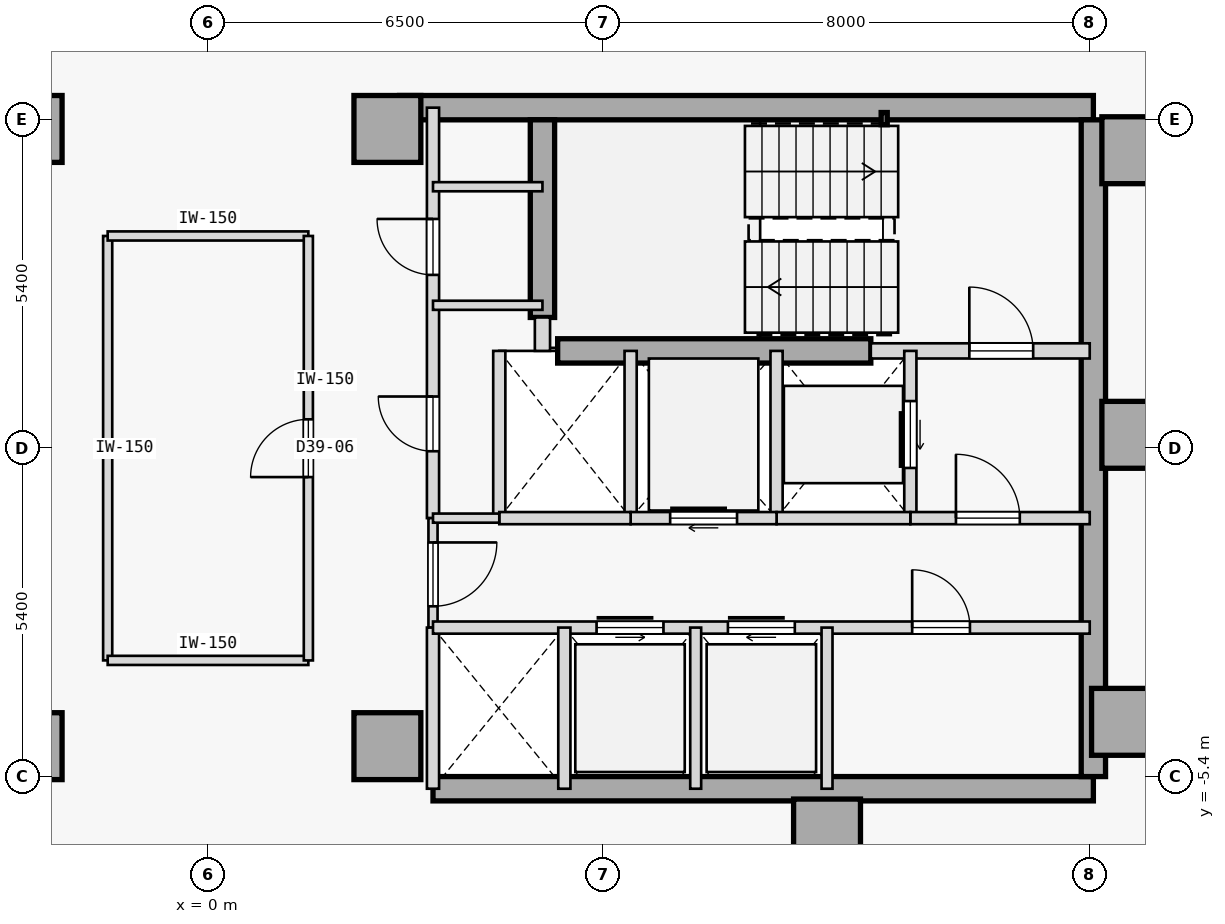
"""IFC4 building model, lengths in metres.
Left out: names, types, materials, properties, quantities, classifications, styles, units other than length and angle.
Written with IfcOpenShell. Run it as: python <this file> out.ifc"""

import sys

from ifc_helpers import new_model, si_unit, direction, frame, frame_2d, origin, origin_2d, place, context, subcontext, project, spatial, rectangle, hollow_rectangle, extrude, element, fill, save


model = new_model("IFC4")
c1 = context("Model", 3, precision=1e-05, world=origin(), true_north=direction((0.0, 1.0)))
c2 = subcontext(c1, "Body", "Model", "MODEL_VIEW")
j1 = project(units=[si_unit("LENGTHUNIT", "METRE"), si_unit("PLANEANGLEUNIT", "RADIAN")], contexts=[c1])
p1 = place(None, origin())
s1 = spatial("IfcSite", under=j1, at=p1, CompositionType="ELEMENT")
p2 = place(p1, origin())
s2 = spatial("IfcBuilding", under=s1, at=p2, CompositionType="ELEMENT")
p3 = place(p2, frame((0.0, 0.0, 154.8)))
s3 = spatial("IfcBuildingStorey", under=s2, at=p3, CompositionType="ELEMENT", Elevation=154.8)
for number, where, z_axis, x_axis in (
    (1, (-2.95, -4.9, 0.0), (0.0, 0.0, 1.0), (1.0, 0.0, 0.0)),
    (2, (-2.95, 5.25, 0.0), (0.0, 0.0, 1.0), (1.0, 0.0, 0.0)),
    (3, (15.25, 4.9, 0.0), (0.0, 0.0, 1.0), (1.0, 0.0, 0.0)),
    (4, (15.25, 0.22, 0.0), (0.0, 0.0, 1.0), (1.0, 0.0, 0.0)),
    (5, (15.08, -4.5, 0.0), (0.0, 0.0, 1.0), (1.0, 0.0, 0.0)),
    (6, (10.18, -6.32, 0.0), (0.0, 0.0, 1.0), (1.0, 0.0, 0.0)),
    (7, (2.95, -4.9, 0.0), (0.0, 0.0, 1.0), (1.0, 0.0, 0.0)),
    (8, (2.95, 5.25, 0.0), (0.0, 0.0, 1.0), (1.0, 0.0, 0.0)),
):
    element("IfcColumn", number, at=place(p3, frame(where, z_axis=z_axis, x_axis=x_axis)), inside=s3, PredefinedType="COLUMN", context=c2, shape_type="SweptSolid", body=[
        extrude(rectangle(XDim=1.1, YDim=1.1, at=origin_2d()), origin(), (0.0, 0.0, 1.0), 3.4),
    ])
p4 = place(p3, frame((3.15, 5.6, 0.0), z_axis=(0.0, 0.0, 1.0), x_axis=(1.0, 0.0, 0.0)))
e9 = element("IfcWall", 9, at=p4, inside=s3, PredefinedType="SHEAR", context=c2, shape_type="SweptSolid", body=[
    extrude(rectangle(XDim=11.41, YDim=0.4, at=frame_2d((5.705, 0.0))), origin(), (0.0, 0.0, 1.0), 3.175),
])
p5 = place(p3, frame((3.7, -5.6, 0.0), z_axis=(0.0, 0.0, 1.0), x_axis=(1.0, 0.0, 0.0)))
e10 = element("IfcWall", 10, at=p5, inside=s3, PredefinedType="SHEAR", context=c2, shape_type="SweptSolid", body=[
    extrude(rectangle(XDim=10.86, YDim=0.4, at=frame_2d((5.43, 0.0))), origin(), (0.0, 0.0, 1.0), 3.175),
])
p6 = place(p3, frame((14.56, -5.4, 0.0), z_axis=(0.0, 0.0, 1.0), x_axis=(0.0, 1.0, 0.0)))
e11 = element("IfcWall", 11, at=p6, inside=s3, PredefinedType="SHEAR", context=c2, shape_type="SweptSolid", body=[
    extrude(rectangle(XDim=10.8, YDim=0.4, at=frame_2d((5.4, 0.0))), origin(), (0.0, 0.0, 1.0), 3.175),
])
p7 = place(p3, frame((5.5, 2.15, 0.0), z_axis=(0.0, 0.0, 1.0), x_axis=(0.0, 1.0, 0.0)))
e12 = element("IfcWall", 12, at=p7, inside=s3, PredefinedType="SHEAR", context=c2, shape_type="SweptSolid", body=[
    extrude(rectangle(XDim=3.25, YDim=0.4, at=frame_2d((1.625, 0.0))), origin(), (0.0, 0.0, 1.0), 3.175),
])
p8 = place(p3, frame((5.75, 1.6, 0.0), z_axis=(0.0, 0.0, 1.0), x_axis=(1.0, 0.0, 0.0)))
e13 = element("IfcWall", 13, at=p8, inside=s3, PredefinedType="SHEAR", context=c2, shape_type="SweptSolid", body=[
    extrude(rectangle(XDim=5.15, YDim=0.4, at=frame_2d((2.575, 0.0))), origin(), (0.0, 0.0, 1.0), 3.175),
])
p9 = place(p3, frame((11.12, 5.42, 0.0), z_axis=(0.0, 0.0, 1.0), x_axis=(1.0, 0.0, 0.0)))
e14 = element("IfcColumn", 14, at=p9, inside=s3, PredefinedType="COLUMN", context=c2, shape_type="SweptSolid", body=[
    extrude(hollow_rectangle(XDim=0.1, YDim=0.2, WallThickness=0.008, at=origin_2d()), origin(), (0.0, 0.0, 1.0), 3.4),
])
p10 = place(p3, frame((10.9, 1.6, 0.0), z_axis=(0.0, 0.0, 1.0), x_axis=(1.0, 0.0, 0.0)))
e15 = element("IfcWall", 15, at=p10, inside=s3, PredefinedType="STANDARD", context=c2, shape_type="SweptSolid", body=[
    extrude(rectangle(XDim=3.6, YDim=0.25, at=frame_2d((1.8, 0.0))), origin(), (0.0, 0.0, 1.0), 3.175),
])
p11 = place(p10, frame((1.62, 0.0, 0.0)))
e16 = element("IfcOpeningElement", 16, at=p11, cuts=e15, PredefinedType="OPENING", context=c2, shape_type="SweptSolid", body=[
    extrude(rectangle(XDim=1.05, YDim=2.15, at=frame_2d((0.525, 1.075))), frame((0.0, 0.135, 0.0), z_axis=(0.0, -1.0, 0.0), x_axis=(1.0, 0.0, 0.0)), (0.0, 0.0, 1.0), 0.27),
])
p12 = place(p3, frame((5.5, 1.6, 0.0), z_axis=(0.0, 0.0, 1.0), x_axis=(0.0, 1.0, 0.0)))
e17 = element("IfcWall", 17, at=p12, inside=s3, PredefinedType="STANDARD", context=c2, shape_type="SweptSolid", body=[
    extrude(rectangle(XDim=0.55, YDim=0.25, at=frame_2d((0.275, 0.0))), origin(), (0.0, 0.0, 1.0), 3.175),
])
p13 = place(p3, frame((3.7, -1.15, 0.0), z_axis=(0.0, 0.0, 1.0), x_axis=(0.0, 1.0, 0.0)))
e18 = element("IfcWall", 18, at=p13, inside=s3, PredefinedType="STANDARD", context=c2, shape_type="SweptSolid", body=[
    extrude(rectangle(XDim=6.75, YDim=0.2, at=frame_2d((3.375, 0.0))), origin(), (0.0, 0.0, 1.0), 3.175),
])
p14 = place(p13, frame((1.1, 0.0, 0.0)))
e19 = element("IfcOpeningElement", 19, at=p14, cuts=e18, PredefinedType="OPENING", context=c2, shape_type="SweptSolid", body=[
    extrude(rectangle(XDim=0.9, YDim=2.15, at=frame_2d((0.45, 1.075))), frame((0.0, 0.11, 0.0), z_axis=(0.0, -1.0, 0.0), x_axis=(1.0, 0.0, 0.0)), (0.0, 0.0, 1.0), 0.22),
])
p15 = place(p13, frame((4.0, 0.0, 0.0)))
e20 = element("IfcOpeningElement", 20, at=p15, cuts=e18, PredefinedType="OPENING", context=c2, shape_type="SweptSolid", body=[
    extrude(rectangle(XDim=0.92, YDim=2.15, at=frame_2d((0.46, 1.075))), frame((0.0, 0.11, 0.0), z_axis=(0.0, -1.0, 0.0), x_axis=(1.0, 0.0, 0.0)), (0.0, 0.0, 1.0), 0.22),
])
p16 = place(p3, frame((3.7, -2.95, 0.0), z_axis=(0.0, 0.0, 1.0), x_axis=(0.0, 1.0, 0.0)))
e21 = element("IfcWall", 21, at=p16, inside=s3, PredefinedType="PARTITIONING", context=c2, shape_type="SweptSolid", body=[
    extrude(rectangle(XDim=1.8, YDim=0.15, at=frame_2d((0.9, 0.0))), origin(), (0.0, 0.0, 1.0), 3.175),
])
p17 = place(p16, frame((0.35, 0.0, 0.0)))
e22 = element("IfcOpeningElement", 22, at=p17, cuts=e21, PredefinedType="OPENING", context=c2, shape_type="SweptSolid", body=[
    extrude(rectangle(XDim=1.05, YDim=2.18, at=frame_2d((0.525, 1.09))), frame((0.0, 0.085, 0.0), z_axis=(0.0, -1.0, 0.0), x_axis=(1.0, 0.0, 0.0)), (0.0, 0.0, 1.0), 0.17),
])
p18 = place(p3, frame((3.7, -5.6, 0.0), z_axis=(0.0, 0.0, 1.0), x_axis=(0.0, 1.0, 0.0)))
e23 = element("IfcWall", 23, at=p18, inside=s3, PredefinedType="STANDARD", context=c2, shape_type="SweptSolid", body=[
    extrude(rectangle(XDim=2.65, YDim=0.2, at=frame_2d((1.325, 0.0))), origin(), (0.0, 0.0, 1.0), 3.175),
])
p19 = place(p3, frame((11.55, -1.15, 0.0), z_axis=(0.0, 0.0, 1.0), x_axis=(0.0, 1.0, 0.0)))
e24 = element("IfcWall", 24, at=p19, inside=s3, PredefinedType="STANDARD", context=c2, shape_type="SweptSolid", body=[
    extrude(rectangle(XDim=2.75, YDim=0.2, at=frame_2d((1.375, 0.0))), origin(), (0.0, 0.0, 1.0), 3.175),
])
p20 = place(p19, frame((0.825, 0.0, 0.0)))
e25 = element("IfcOpeningElement", 25, at=p20, cuts=e24, PredefinedType="OPENING", context=c2, shape_type="SweptSolid", body=[
    extrude(rectangle(XDim=1.1, YDim=2.15, at=frame_2d((0.55, 1.075))), frame((0.0, 0.11, 0.0), z_axis=(0.0, -1.0, 0.0), x_axis=(1.0, 0.0, 0.0)), (0.0, 0.0, 1.0), 0.22),
])
p21 = place(p3, frame((9.35, -1.15, 0.0), z_axis=(0.0, 0.0, 1.0), x_axis=(0.0, 1.0, 0.0)))
e26 = element("IfcWall", 26, at=p21, inside=s3, PredefinedType="STANDARD", context=c2, shape_type="SweptSolid", body=[
    extrude(rectangle(XDim=2.75, YDim=0.2, at=frame_2d((1.375, 0.0))), origin(), (0.0, 0.0, 1.0), 3.175),
])
p22 = place(p3, frame((11.55, -1.15, 0.0), z_axis=(0.0, 0.0, 1.0), x_axis=(1.0, 0.0, 0.0)))
e27 = element("IfcWall", 27, at=p22, inside=s3, PredefinedType="STANDARD", context=c2, shape_type="SweptSolid", body=[
    extrude(rectangle(XDim=2.95, YDim=0.2, at=frame_2d((1.475, 0.0))), origin(), (0.0, 0.0, 1.0), 3.175),
])
p23 = place(p22, frame((0.75, 0.0, 0.0)))
e28 = element("IfcOpeningElement", 28, at=p23, cuts=e27, PredefinedType="OPENING", context=c2, shape_type="SweptSolid", body=[
    extrude(rectangle(XDim=1.05, YDim=2.18, at=frame_2d((0.525, 1.09))), frame((0.0, 0.11, 0.0), z_axis=(0.0, -1.0, 0.0), x_axis=(1.0, 0.0, 0.0)), (0.0, 0.0, 1.0), 0.22),
])
p24 = place(p3, frame((9.35, -1.15, 0.0), z_axis=(0.0, 0.0, 1.0), x_axis=(1.0, 0.0, 0.0)))
e29 = element("IfcWall", 29, at=p24, inside=s3, PredefinedType="STANDARD", context=c2, shape_type="SweptSolid", body=[
    extrude(rectangle(XDim=2.2, YDim=0.2, at=frame_2d((1.1, 0.0))), origin(), (0.0, 0.0, 1.0), 3.175),
])
p25 = place(p3, frame((6.95, -1.15, 0.0), z_axis=(0.0, 0.0, 1.0), x_axis=(0.0, 1.0, 0.0)))
e30 = element("IfcWall", 30, at=p25, inside=s3, PredefinedType="STANDARD", context=c2, shape_type="SweptSolid", body=[
    extrude(rectangle(XDim=2.75, YDim=0.2, at=frame_2d((1.375, 0.0))), origin(), (0.0, 0.0, 1.0), 3.175),
])
p26 = place(p3, frame((6.95, -1.15, 0.0), z_axis=(0.0, 0.0, 1.0), x_axis=(1.0, 0.0, 0.0)))
e31 = element("IfcWall", 31, at=p26, inside=s3, PredefinedType="STANDARD", context=c2, shape_type="SweptSolid", body=[
    extrude(rectangle(XDim=2.4, YDim=0.2, at=frame_2d((1.2, 0.0))), origin(), (0.0, 0.0, 1.0), 3.175),
])
p27 = place(p26, frame((0.65, 0.0, 0.0)))
e32 = element("IfcOpeningElement", 32, at=p27, cuts=e31, PredefinedType="OPENING", context=c2, shape_type="SweptSolid", body=[
    extrude(rectangle(XDim=1.1, YDim=2.15, at=frame_2d((0.55, 1.075))), frame((0.0, 0.11, 0.0), z_axis=(0.0, -1.0, 0.0), x_axis=(1.0, 0.0, 0.0)), (0.0, 0.0, 1.0), 0.22),
])
p28 = place(p3, frame((4.79, -1.15, 0.0), z_axis=(0.0, 0.0, 1.0), x_axis=(0.0, 1.0, 0.0)))
e33 = element("IfcWall", 33, at=p28, inside=s3, PredefinedType="STANDARD", context=c2, shape_type="SweptSolid", body=[
    extrude(rectangle(XDim=2.75, YDim=0.2, at=frame_2d((1.375, 0.0))), origin(), (0.0, 0.0, 1.0), 3.175),
])
p29 = place(p3, frame((4.79, -1.15, 0.0), z_axis=(0.0, 0.0, 1.0), x_axis=(1.0, 0.0, 0.0)))
e34 = element("IfcWall", 34, at=p29, inside=s3, PredefinedType="STANDARD", context=c2, shape_type="SweptSolid", body=[
    extrude(rectangle(XDim=2.16, YDim=0.2, at=frame_2d((1.08, 0.0))), origin(), (0.0, 0.0, 1.0), 3.175),
])
p30 = place(p3, frame((3.7, -1.15, 0.0), z_axis=(0.0, 0.0, 1.0), x_axis=(1.0, 0.0, 0.0)))
e35 = element("IfcWall", 35, at=p30, inside=s3, PredefinedType="PARTITIONING", context=c2, shape_type="SweptSolid", body=[
    extrude(rectangle(XDim=1.09, YDim=0.15, at=frame_2d((0.545, 0.0))), origin(), (0.0, 0.0, 1.0), 3.175),
])
p31 = place(p3, frame((3.7, -2.95, 0.0), z_axis=(0.0, 0.0, 1.0), x_axis=(1.0, 0.0, 0.0)))
e36 = element("IfcWall", 36, at=p31, inside=s3, PredefinedType="STANDARD", context=c2, shape_type="SweptSolid", body=[
    extrude(rectangle(XDim=10.8, YDim=0.2, at=frame_2d((5.4, 0.0))), origin(), (0.0, 0.0, 1.0), 3.175),
])
p32 = place(p31, frame((2.69, 0.0, 0.0)))
e37 = element("IfcOpeningElement", 37, at=p32, cuts=e36, PredefinedType="OPENING", context=c2, shape_type="SweptSolid", body=[
    extrude(rectangle(XDim=1.1, YDim=2.15, at=frame_2d((0.55, 1.075))), frame((0.0, 0.11, 0.0), z_axis=(0.0, -1.0, 0.0), x_axis=(1.0, 0.0, 0.0)), (0.0, 0.0, 1.0), 0.22),
])
p33 = place(p31, frame((4.85, 0.0, 0.0)))
e38 = element("IfcOpeningElement", 38, at=p33, cuts=e36, PredefinedType="OPENING", context=c2, shape_type="SweptSolid", body=[
    extrude(rectangle(XDim=1.1, YDim=2.15, at=frame_2d((0.55, 1.075))), frame((0.0, 0.11, 0.0), z_axis=(0.0, -1.0, 0.0), x_axis=(1.0, 0.0, 0.0)), (0.0, 0.0, 1.0), 0.22),
])
p34 = place(p31, frame((7.88, 0.0, 0.0)))
e39 = element("IfcOpeningElement", 39, at=p34, cuts=e36, PredefinedType="OPENING", context=c2, shape_type="SweptSolid", body=[
    extrude(rectangle(XDim=0.95, YDim=2.15, at=frame_2d((0.475, 1.075))), frame((0.0, 0.11, 0.0), z_axis=(0.0, -1.0, 0.0), x_axis=(1.0, 0.0, 0.0)), (0.0, 0.0, 1.0), 0.22),
])
p35 = place(p3, frame((5.86, -5.6, 0.0), z_axis=(0.0, 0.0, 1.0), x_axis=(0.0, 1.0, 0.0)))
e40 = element("IfcWall", 40, at=p35, inside=s3, PredefinedType="STANDARD", context=c2, shape_type="SweptSolid", body=[
    extrude(rectangle(XDim=2.65, YDim=0.2, at=frame_2d((1.325, 0.0))), origin(), (0.0, 0.0, 1.0), 3.175),
])
for number, where, z_axis, x_axis in (
    (41, (10.18, -5.6, 0.0), (0.0, 0.0, 1.0), (0.0, 1.0, 0.0)),
    (42, (8.02, -5.6, 0.0), (0.0, 0.0, 1.0), (0.0, 1.0, 0.0)),
):
    element("IfcWall", number, at=place(p3, frame(where, z_axis=z_axis, x_axis=x_axis)), inside=s3, PredefinedType="STANDARD", context=c2, shape_type="SweptSolid", body=[
        extrude(rectangle(XDim=2.65, YDim=0.18, at=frame_2d((1.325, 0.0))), origin(), (0.0, 0.0, 1.0), 3.175),
    ])
for number, where, z_axis, x_axis in (
    (43, (3.7, 4.3, 0.0), (0.0, 0.0, 1.0), (1.0, 0.0, 0.0)),
    (44, (3.7, 2.35, 0.0), (0.0, 0.0, 1.0), (1.0, 0.0, 0.0)),
):
    element("IfcWall", number, at=place(p3, frame(where, z_axis=z_axis, x_axis=x_axis)), inside=s3, PredefinedType="PARTITIONING", context=c2, shape_type="SweptSolid", body=[
        extrude(rectangle(XDim=1.8, YDim=0.15, at=frame_2d((0.9, 0.0))), origin(), (0.0, 0.0, 1.0), 3.175),
    ])
p36 = place(p3, frame((-1.65, -3.49, 0.0), z_axis=(0.0, 0.0, 1.0), x_axis=(-3.4979712e-05, 0.999999999388, 0.0)))
e45 = element("IfcWall", 45, at=p36, inside=s3, PredefinedType="PARTITIONING", context=c2, shape_type="SweptSolid", body=[
    extrude(rectangle(XDim=6.979, YDim=0.15, at=frame_2d((3.49, 0.0))), origin(), (0.0, 0.0, 1.0), 3.175),
])
p37 = place(p3, frame((-1.65, -3.49, 0.0), z_axis=(0.0, 0.0, 1.0), x_axis=(0.999999975374, -0.000221926315, 0.0)))
e46 = element("IfcWall", 46, at=p37, inside=s3, PredefinedType="PARTITIONING", context=c2, shape_type="SweptSolid", body=[
    extrude(rectangle(XDim=3.3, YDim=0.15, at=frame_2d((1.65, 0.0))), origin(), (0.0, 0.0, 1.0), 3.175),
])
p38 = place(p3, frame((-1.65, 3.49, 0.0), z_axis=(0.0, 0.0, 1.0), x_axis=(1.0, 0.0, 0.0)))
e47 = element("IfcWall", 47, at=p38, inside=s3, PredefinedType="PARTITIONING", context=c2, shape_type="SweptSolid", body=[
    extrude(rectangle(XDim=3.3, YDim=0.15, at=frame_2d((1.65, 0.0))), origin(), (0.0, 0.0, 1.0), 3.175),
])
p39 = place(p3, frame((1.65, -3.49, 0.0), z_axis=(0.0, 0.0, 1.0), x_axis=(-6.9952083e-05, 0.999999997553, 0.0)))
e48 = element("IfcWall", 48, at=p39, inside=s3, PredefinedType="PARTITIONING", context=c2, shape_type="SweptSolid", body=[
    extrude(rectangle(XDim=6.98, YDim=0.15, at=frame_2d((3.49, 0.0))), origin(), (0.0, 0.0, 1.0), 3.175),
])
p40 = place(p39, frame((3.015, 0.0, 0.0)))
e49 = element("IfcOpeningElement", 49, at=p40, cuts=e48, PredefinedType="OPENING", context=c2, shape_type="SweptSolid", body=[
    extrude(rectangle(XDim=0.95, YDim=2.15, at=frame_2d((0.475, 1.075))), frame((0.0, 0.085, 0.0), z_axis=(0.0, -1.0, 0.0), x_axis=(1.0, 0.0, 0.0)), (0.0, 0.0, 1.0), 0.17),
])
p41 = place(p11, origin())
e50 = element("IfcDoor", 50, at=p41, inside=s3, OperationType="SINGLE_SWING_LEFT", PredefinedType="DOOR", context=c2, shape_type="SweptSolid", body=[
    extrude(rectangle(XDim=1.05, YDim=2.15, at=frame_2d((0.525, 1.075))), frame((0.0, 0.025, 0.0), z_axis=(0.0, -1.0, 0.0), x_axis=(1.0, 0.0, 0.0)), (0.0, 0.0, 1.0), 0.05),
])
fill(e16, e50)
p42 = place(p23, origin())
e51 = element("IfcDoor", 51, at=p42, inside=s3, OperationType="SINGLE_SWING_LEFT", PredefinedType="DOOR", context=c2, shape_type="SweptSolid", body=[
    extrude(rectangle(XDim=1.05, YDim=2.18, at=frame_2d((0.525, 1.09))), frame((0.0, 0.025, 0.0), z_axis=(0.0, -1.0, 0.0), x_axis=(1.0, 0.0, 0.0)), (0.0, 0.0, 1.0), 0.05),
])
fill(e28, e51)
p43 = place(p17, frame((1.05, 0.0, 0.0), z_axis=(0.0, 0.0, 1.0), x_axis=(-1.0, 0.0, 0.0)))
e52 = element("IfcDoor", 52, at=p43, inside=s3, OperationType="SINGLE_SWING_RIGHT", PredefinedType="DOOR", context=c2, shape_type="SweptSolid", body=[
    extrude(rectangle(XDim=1.05, YDim=2.18, at=frame_2d((0.525, 1.09))), frame((0.0, 0.025, 0.0), z_axis=(0.0, -1.0, 0.0), x_axis=(1.0, 0.0, 0.0)), (0.0, 0.0, 1.0), 0.05),
])
fill(e22, e52)
p44 = place(p20, origin())
e53 = element("IfcDoor", 53, at=p44, inside=s3, OperationType="SLIDING_TO_RIGHT", PredefinedType="DOOR", context=c2, shape_type="SweptSolid", body=[
    extrude(rectangle(XDim=1.1, YDim=2.15, at=frame_2d((0.55, 1.075))), frame((0.0, 0.025, 0.0), z_axis=(0.0, -1.0, 0.0), x_axis=(1.0, 0.0, 0.0)), (0.0, 0.0, 1.0), 0.05),
])
fill(e25, e53)
p45 = place(p27, origin())
e54 = element("IfcDoor", 54, at=p45, inside=s3, OperationType="SLIDING_TO_RIGHT", PredefinedType="DOOR", context=c2, shape_type="SweptSolid", body=[
    extrude(rectangle(XDim=1.1, YDim=2.15, at=frame_2d((0.55, 1.075))), frame((0.0, 0.025, 0.0), z_axis=(0.0, -1.0, 0.0), x_axis=(1.0, 0.0, 0.0)), (0.0, 0.0, 1.0), 0.05),
])
fill(e32, e54)
p46 = place(p32, origin())
e55 = element("IfcDoor", 55, at=p46, inside=s3, OperationType="SLIDING_TO_LEFT", PredefinedType="DOOR", context=c2, shape_type="SweptSolid", body=[
    extrude(rectangle(XDim=1.1, YDim=2.15, at=frame_2d((0.55, 1.075))), frame((0.0, 0.025, 0.0), z_axis=(0.0, -1.0, 0.0), x_axis=(1.0, 0.0, 0.0)), (0.0, 0.0, 1.0), 0.05),
])
fill(e37, e55)
p47 = place(p33, origin())
e56 = element("IfcDoor", 56, at=p47, inside=s3, OperationType="SLIDING_TO_RIGHT", PredefinedType="DOOR", context=c2, shape_type="SweptSolid", body=[
    extrude(rectangle(XDim=1.1, YDim=2.15, at=frame_2d((0.55, 1.075))), frame((0.0, 0.025, 0.0), z_axis=(0.0, -1.0, 0.0), x_axis=(1.0, 0.0, 0.0)), (0.0, 0.0, 1.0), 0.05),
])
fill(e38, e56)
p48 = place(p34, origin())
e57 = element("IfcDoor", 57, at=p48, inside=s3, OperationType="SINGLE_SWING_LEFT", PredefinedType="DOOR", context=c2, shape_type="SweptSolid", body=[
    extrude(rectangle(XDim=0.95, YDim=2.15, at=frame_2d((0.475, 1.075))), frame((0.0, 0.025, 0.0), z_axis=(0.0, -1.0, 0.0), x_axis=(1.0, 0.0, 0.0)), (0.0, 0.0, 1.0), 0.05),
])
fill(e39, e57)
p49 = place(p14, origin())
e58 = element("IfcDoor", 58, at=p49, inside=s3, OperationType="SINGLE_SWING_RIGHT", PredefinedType="DOOR", context=c2, shape_type="SweptSolid", body=[
    extrude(rectangle(XDim=0.9, YDim=2.15, at=frame_2d((0.45, 1.075))), frame((0.0, 0.025, 0.0), z_axis=(0.0, -1.0, 0.0), x_axis=(1.0, 0.0, 0.0)), (0.0, 0.0, 1.0), 0.05),
])
fill(e19, e58)
p50 = place(p15, origin())
e59 = element("IfcDoor", 59, at=p50, inside=s3, OperationType="SINGLE_SWING_RIGHT", PredefinedType="DOOR", context=c2, shape_type="SweptSolid", body=[
    extrude(rectangle(XDim=0.92, YDim=2.15, at=frame_2d((0.46, 1.075))), frame((0.0, 0.025, 0.0), z_axis=(0.0, -1.0, 0.0), x_axis=(1.0, 0.0, 0.0)), (0.0, 0.0, 1.0), 0.05),
])
fill(e20, e59)
p51 = place(p40, origin())
e60 = element("IfcDoor", 60, at=p51, inside=s3, OperationType="SINGLE_SWING_LEFT", PredefinedType="DOOR", context=c2, shape_type="SweptSolid", body=[
    extrude(rectangle(XDim=0.95, YDim=2.15, at=frame_2d((0.475, 1.075))), frame((0.0, 0.025, 0.0), z_axis=(0.0, -1.0, 0.0), x_axis=(1.0, 0.0, 0.0)), (0.0, 0.0, 1.0), 0.05),
])
fill(e49, e60)
save(model, sys.argv[1])
